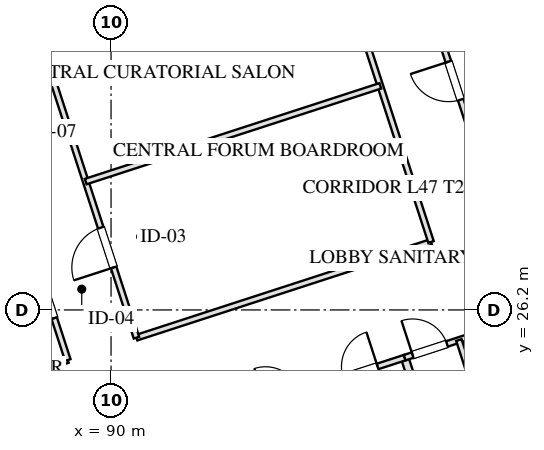
"""IFC4 building model, lengths in metres.
Left out: names, types, materials, properties, quantities, classifications, styles, units other than length and angle.
Written with IfcOpenShell. Run it as: python <this file> out.ifc"""

import sys

from ifc_helpers import new_model, si_unit, direction, frame, frame_2d, origin, place, context, subcontext, project, spatial, rectangle, extrude, element, fill, save


model = new_model("IFC4")
c1 = context("Model", 3, precision=1e-05, world=origin(), true_north=direction((0.0, 1.0)))
c2 = subcontext(c1, "Body", "Model", "MODEL_VIEW")
j1 = project(units=[si_unit("LENGTHUNIT", "METRE"), si_unit("PLANEANGLEUNIT", "RADIAN")], contexts=[c1])
p1 = place(None, origin())
s1 = spatial("IfcSite", under=j1, at=p1, CompositionType="ELEMENT")
p2 = place(p1, origin())
s2 = spatial("IfcBuilding", under=s1, at=p2, CompositionType="ELEMENT")
p3 = place(p2, frame((0.0, 0.0, 177.1)))
s3 = spatial("IfcBuildingStorey", under=s2, at=p3, CompositionType="ELEMENT", Elevation=177.1)
p4 = place(p3, frame((98.224, 59.173, 0.0), z_axis=(0.0, 0.0, 1.0), x_axis=(0.309014228706, -0.951057414911, 0.0)))
e1 = element("IfcWall", 1, at=p4, inside=s3, PredefinedType="SOLIDWALL", context=c2, shape_type="SweptSolid", body=[
    extrude(rectangle(XDim=42.8, YDim=0.4, at=frame_2d((21.4, 0.0))), origin(), (0.0, 0.0, 1.0), 2.61),
])
p5 = place(p4, frame((26.75, 0.0, 0.75)))
e2 = element("IfcOpeningElement", 2, at=p5, cuts=e1, PredefinedType="OPENING", context=c2, shape_type="SweptSolid", body=[
    extrude(rectangle(XDim=2.1, YDim=1.46, at=frame_2d((1.05, 0.73))), frame((0.0, 0.21, 0.0), z_axis=(0.0, -1.0, 0.0), x_axis=(1.0, 0.0, 0.0)), (0.0, 0.0, 1.0), 0.42),
])
p6 = place(p4, frame((22.95, 0.0, 0.75)))
e3 = element("IfcOpeningElement", 3, at=p6, cuts=e1, PredefinedType="OPENING", context=c2, shape_type="SweptSolid", body=[
    extrude(rectangle(XDim=2.1, YDim=1.46, at=frame_2d((1.05, 0.73))), frame((0.0, 0.21, 0.0), z_axis=(0.0, -1.0, 0.0), x_axis=(1.0, 0.0, 0.0)), (0.0, 0.0, 1.0), 0.42),
])
p7 = place(p4, frame((16.45, 0.0, 0.0)))
e4 = element("IfcOpeningElement", 4, at=p7, cuts=e1, PredefinedType="OPENING", context=c2, shape_type="SweptSolid", body=[
    extrude(rectangle(XDim=1.1, YDim=2.15, at=frame_2d((0.55, 1.075))), frame((0.0, 0.21, 0.0), z_axis=(0.0, -1.0, 0.0), x_axis=(1.0, 0.0, 0.0)), (0.0, 0.0, 1.0), 0.42),
])
p8 = place(p3, frame((97.727, 24.944, 0.0), z_axis=(0.0, 0.0, 1.0), x_axis=(0.309016001439, -0.951056838919, 0.0)))
e5 = element("IfcWall", 5, at=p8, inside=s3, PredefinedType="PARTITIONING", context=c2, shape_type="SweptSolid", body=[
    extrude(rectangle(XDim=8.43, YDim=0.2, at=frame_2d((4.215, 0.0))), origin(), (0.0, 0.0, 1.0), 3.175),
])
p9 = place(p3, frame((93.542, 23.585, 0.0), z_axis=(0.0, 0.0, 1.0), x_axis=(0.951063829732, 0.308994485023, 0.0)))
e6 = element("IfcWall", 6, at=p9, inside=s3, PredefinedType="PARTITIONING", context=c2, shape_type="SweptSolid", body=[
    extrude(rectangle(XDim=4.4, YDim=0.15, at=frame_2d((2.2, 0.0))), origin(), (0.0, 0.0, 1.0), 3.175),
])
p10 = place(p9, frame((0.55, 0.0, 0.0)))
e7 = element("IfcOpeningElement", 7, at=p10, cuts=e6, PredefinedType="OPENING", context=c2, shape_type="SweptSolid", body=[
    extrude(rectangle(XDim=0.95, YDim=2.05, at=frame_2d((0.475, 1.025))), frame((0.0, 0.085, 0.0), z_axis=(0.0, -1.0, 0.0), x_axis=(1.0, 0.0, 0.0)), (0.0, 0.0, 1.0), 0.17),
])
p11 = place(p9, frame((2.7, 0.0, 0.0)))
e8 = element("IfcOpeningElement", 8, at=p11, cuts=e6, PredefinedType="OPENING", context=c2, shape_type="SweptSolid", body=[
    extrude(rectangle(XDim=0.95, YDim=2.05, at=frame_2d((0.475, 1.025))), frame((0.0, 0.085, 0.0), z_axis=(0.0, -1.0, 0.0), x_axis=(1.0, 0.0, 0.0)), (0.0, 0.0, 1.0), 0.17),
])
p12 = place(p3, frame((97.727, 24.944, 0.0), z_axis=(0.0, 0.0, 1.0), x_axis=(0.951036872128, 0.309077446369, 0.0)))
e9 = element("IfcWall", 9, at=p12, inside=s3, PredefinedType="PARTITIONING", context=c2, shape_type="SweptSolid", body=[
    extrude(rectangle(XDim=3.2, YDim=0.15, at=frame_2d((1.6, 0.0))), origin(), (0.0, 0.0, 1.0), 3.175),
])
p13 = place(p12, frame((0.22, 0.0, 0.0)))
e10 = element("IfcOpeningElement", 10, at=p13, cuts=e9, PredefinedType="OPENING", context=c2, shape_type="SweptSolid", body=[
    extrude(rectangle(XDim=0.95, YDim=2.05, at=frame_2d((0.475, 1.025))), frame((0.0, 0.085, 0.0), z_axis=(0.0, -1.0, 0.0), x_axis=(1.0, 0.0, 0.0)), (0.0, 0.0, 1.0), 0.17),
])
p14 = place(p3, frame((99.153, 25.408, 0.0), z_axis=(0.0, 0.0, 1.0), x_axis=(0.309016001439, -0.951056838919, 0.0)))
e11 = element("IfcWall", 11, at=p14, inside=s3, PredefinedType="PARTITIONING", context=c2, shape_type="SweptSolid", body=[
    extrude(rectangle(XDim=8.43, YDim=0.15, at=frame_2d((4.215, 0.0))), origin(), (0.0, 0.0, 1.0), 3.175),
])
p15 = place(p14, frame((2.55, 0.0, 0.0)))
e12 = element("IfcOpeningElement", 12, at=p15, cuts=e11, PredefinedType="OPENING", context=c2, shape_type="SweptSolid", body=[
    extrude(rectangle(XDim=0.95, YDim=2.05, at=frame_2d((0.475, 1.025))), frame((0.0, 0.085, 0.0), z_axis=(0.0, -1.0, 0.0), x_axis=(1.0, 0.0, 0.0)), (0.0, 0.0, 1.0), 0.17),
])
p16 = place(p14, frame((4.7, 0.0, 0.0)))
e13 = element("IfcOpeningElement", 13, at=p16, cuts=e11, PredefinedType="OPENING", context=c2, shape_type="SweptSolid", body=[
    extrude(rectangle(XDim=0.9, YDim=2.05, at=frame_2d((0.45, 1.025))), frame((0.0, 0.085, 0.0), z_axis=(0.0, -1.0, 0.0), x_axis=(1.0, 0.0, 0.0)), (0.0, 0.0, 1.0), 0.17),
])
p17 = place(p14, frame((6.8, 0.0, 0.0)))
e14 = element("IfcOpeningElement", 14, at=p17, cuts=e11, PredefinedType="OPENING", context=c2, shape_type="SweptSolid", body=[
    extrude(rectangle(XDim=0.9, YDim=2.05, at=frame_2d((0.45, 1.025))), frame((0.0, 0.085, 0.0), z_axis=(0.0, -1.0, 0.0), x_axis=(1.0, 0.0, 0.0)), (0.0, 0.0, 1.0), 0.17),
])
p18 = place(p3, frame((77.925, 21.328, 0.0), z_axis=(0.0, 0.0, 1.0), x_axis=(0.951054972381, 0.309021746015, 0.0)))
e15 = element("IfcWall", 15, at=p18, inside=s3, PredefinedType="PARTITIONING", context=c2, shape_type="SweptSolid", body=[
    extrude(rectangle(XDim=11.5, YDim=0.15, at=frame_2d((5.75, 0.0))), origin(), (0.0, 0.0, 1.0), 3.175),
])
p19 = place(p3, frame((90.669, 25.469, 0.0), z_axis=(0.0, 0.0, 1.0), x_axis=(0.95106136293, 0.309002077568, 0.0)))
e16 = element("IfcWall", 16, at=p19, inside=s3, PredefinedType="PARTITIONING", context=c2, shape_type="SweptSolid", body=[
    extrude(rectangle(XDim=8.15, YDim=0.15, at=frame_2d((4.075, 0.0))), origin(), (0.0, 0.0, 1.0), 3.175),
])
p20 = place(p3, frame((88.862, 24.882, 0.0), z_axis=(0.0, 0.0, 1.0), x_axis=(-0.309008771245, 0.951059188113, 0.0)))
e17 = element("IfcWall", 17, at=p20, inside=s3, PredefinedType="PARTITIONING", context=c2, shape_type="SweptSolid", body=[
    extrude(rectangle(XDim=16.64, YDim=0.15, at=frame_2d((8.32, 0.0))), origin(), (0.0, 0.0, 1.0), 3.175),
])
p21 = place(p20, frame((1.16, 0.0, 0.0)))
e18 = element("IfcOpeningElement", 18, at=p21, cuts=e17, PredefinedType="OPENING", context=c2, shape_type="SweptSolid", body=[
    extrude(rectangle(XDim=1.0, YDim=2.05, at=frame_2d((0.5, 1.025))), frame((0.0, 0.085, 0.0), z_axis=(0.0, -1.0, 0.0), x_axis=(1.0, 0.0, 0.0)), (0.0, 0.0, 1.0), 0.17),
])
p22 = place(p20, frame((5.48, 0.0, 0.0)))
e19 = element("IfcOpeningElement", 19, at=p22, cuts=e17, PredefinedType="OPENING", context=c2, shape_type="SweptSolid", body=[
    extrude(rectangle(XDim=1.05, YDim=2.05, at=frame_2d((0.525, 1.025))), frame((0.0, 0.085, 0.0), z_axis=(0.0, -1.0, 0.0), x_axis=(1.0, 0.0, 0.0)), (0.0, 0.0, 1.0), 0.17),
])
p23 = place(p20, frame((8.08, 0.0, 0.0)))
e20 = element("IfcOpeningElement", 20, at=p23, cuts=e17, PredefinedType="OPENING", context=c2, shape_type="SweptSolid", body=[
    extrude(rectangle(XDim=1.0, YDim=2.05, at=frame_2d((0.5, 1.025))), frame((0.0, 0.085, 0.0), z_axis=(0.0, -1.0, 0.0), x_axis=(1.0, 0.0, 0.0)), (0.0, 0.0, 1.0), 0.17),
])
p24 = place(p20, frame((10.92, 0.0, 0.0)))
e21 = element("IfcOpeningElement", 21, at=p24, cuts=e17, PredefinedType="OPENING", context=c2, shape_type="SweptSolid", body=[
    extrude(rectangle(XDim=1.0, YDim=2.05, at=frame_2d((0.5, 1.025))), frame((0.0, 0.085, 0.0), z_axis=(0.0, -1.0, 0.0), x_axis=(1.0, 0.0, 0.0)), (0.0, 0.0, 1.0), 0.17),
])
p25 = place(p20, frame((14.48, 0.0, 0.0)))
e22 = element("IfcOpeningElement", 22, at=p25, cuts=e17, PredefinedType="OPENING", context=c2, shape_type="SweptSolid", body=[
    extrude(rectangle(XDim=1.0, YDim=2.05, at=frame_2d((0.5, 1.025))), frame((0.0, 0.085, 0.0), z_axis=(0.0, -1.0, 0.0), x_axis=(1.0, 0.0, 0.0)), (0.0, 0.0, 1.0), 0.17),
])
p26 = place(p3, frame((90.669, 25.469, 0.0), z_axis=(0.0, 0.0, 1.0), x_axis=(-0.309022042254, 0.951054876125, 0.0)))
e23 = element("IfcWall", 23, at=p26, inside=s3, PredefinedType="PARTITIONING", context=c2, shape_type="SweptSolid", body=[
    extrude(rectangle(XDim=16.64, YDim=0.15, at=frame_2d((8.32, 0.0))), origin(), (0.0, 0.0, 1.0), 3.175),
])
p27 = place(p26, frame((1.944, 0.0, 0.0)))
e24 = element("IfcOpeningElement", 24, at=p27, cuts=e23, PredefinedType="OPENING", context=c2, shape_type="SweptSolid", body=[
    extrude(rectangle(XDim=1.1, YDim=2.05, at=frame_2d((0.55, 1.025))), frame((0.0, 0.085, 0.0), z_axis=(0.0, -1.0, 0.0), x_axis=(1.0, 0.0, 0.0)), (0.0, 0.0, 1.0), 0.17),
])
p28 = place(p26, frame((14.264, 0.0, 0.0)))
e25 = element("IfcOpeningElement", 25, at=p28, cuts=e23, PredefinedType="OPENING", context=c2, shape_type="SweptSolid", body=[
    extrude(rectangle(XDim=1.1, YDim=2.05, at=frame_2d((0.55, 1.025))), frame((0.0, 0.085, 0.0), z_axis=(0.0, -1.0, 0.0), x_axis=(1.0, 0.0, 0.0)), (0.0, 0.0, 1.0), 0.17),
])
p29 = place(p3, frame((98.42, 27.988, 0.0), z_axis=(0.0, 0.0, 1.0), x_axis=(-0.309004459387, 0.951060589068, 0.0)))
e26 = element("IfcWall", 26, at=p29, inside=s3, PredefinedType="PARTITIONING", context=c2, shape_type="SweptSolid", body=[
    extrude(rectangle(XDim=16.64, YDim=0.15, at=frame_2d((8.32, 0.0))), origin(), (0.0, 0.0, 1.0), 3.175),
])
p30 = place(p29, frame((7.68, 0.0, 0.0)))
e27 = element("IfcOpeningElement", 27, at=p30, cuts=e26, PredefinedType="OPENING", context=c2, shape_type="SweptSolid", body=[
    extrude(rectangle(XDim=1.1, YDim=2.05, at=frame_2d((0.55, 1.025))), frame((0.0, 0.085, 0.0), z_axis=(0.0, -1.0, 0.0), x_axis=(1.0, 0.0, 0.0)), (0.0, 0.0, 1.0), 0.17),
])
p31 = place(p3, frame((100.227, 28.575, 0.0), z_axis=(0.0, 0.0, 1.0), x_axis=(-0.30901773025, 0.951056277195, 0.0)))
e28 = element("IfcWall", 28, at=p31, inside=s3, PredefinedType="PARTITIONING", context=c2, shape_type="SweptSolid", body=[
    extrude(rectangle(XDim=16.64, YDim=0.15, at=frame_2d((8.32, 0.0))), origin(), (0.0, 0.0, 1.0), 3.175),
])
p32 = place(p31, frame((3.32, 0.0, 0.0)))
e29 = element("IfcOpeningElement", 29, at=p32, cuts=e28, PredefinedType="OPENING", context=c2, shape_type="SweptSolid", body=[
    extrude(rectangle(XDim=1.05, YDim=2.05, at=frame_2d((0.525, 1.025))), frame((0.0, 0.085, 0.0), z_axis=(0.0, -1.0, 0.0), x_axis=(1.0, 0.0, 0.0)), (0.0, 0.0, 1.0), 0.17),
])
p33 = place(p31, frame((11.64, 0.0, 0.0)))
e30 = element("IfcOpeningElement", 30, at=p33, cuts=e28, PredefinedType="OPENING", context=c2, shape_type="SweptSolid", body=[
    extrude(rectangle(XDim=1.0, YDim=2.05, at=frame_2d((0.5, 1.025))), frame((0.0, 0.085, 0.0), z_axis=(0.0, -1.0, 0.0), x_axis=(1.0, 0.0, 0.0)), (0.0, 0.0, 1.0), 0.17),
])
p34 = place(p3, frame((89.334, 29.578, 0.0), z_axis=(0.0, 0.0, 1.0), x_axis=(0.951052558989, 0.309029173445, 0.0)))
e31 = element("IfcWall", 31, at=p34, inside=s3, PredefinedType="PARTITIONING", context=c2, shape_type="SweptSolid", body=[
    extrude(rectangle(XDim=8.15, YDim=0.15, at=frame_2d((4.075, 0.0))), origin(), (0.0, 0.0, 1.0), 3.175),
])
p35 = place(p11, origin())
e32 = element("IfcDoor", 32, at=p35, inside=s3, OperationType="SINGLE_SWING_RIGHT", PredefinedType="DOOR", context=c2, shape_type="SweptSolid", body=[
    extrude(rectangle(XDim=0.95, YDim=2.05, at=frame_2d((0.475, 1.025))), frame((0.0, 0.025, 0.0), z_axis=(0.0, -1.0, 0.0), x_axis=(1.0, 0.0, 0.0)), (0.0, 0.0, 1.0), 0.05),
])
fill(e8, e32)
p36 = place(p13, origin())
e33 = element("IfcDoor", 33, at=p36, inside=s3, OperationType="SINGLE_SWING_LEFT", PredefinedType="DOOR", context=c2, shape_type="SweptSolid", body=[
    extrude(rectangle(XDim=0.95, YDim=2.05, at=frame_2d((0.475, 1.025))), frame((0.0, 0.025, 0.0), z_axis=(0.0, -1.0, 0.0), x_axis=(1.0, 0.0, 0.0)), (0.0, 0.0, 1.0), 0.05),
])
fill(e10, e33)
p37 = place(p21, origin())
e34 = element("IfcDoor", 34, at=p37, inside=s3, OperationType="SINGLE_SWING_LEFT", PredefinedType="DOOR", context=c2, shape_type="SweptSolid", body=[
    extrude(rectangle(XDim=1.0, YDim=2.05, at=frame_2d((0.5, 1.025))), frame((0.0, 0.025, 0.0), z_axis=(0.0, -1.0, 0.0), x_axis=(1.0, 0.0, 0.0)), (0.0, 0.0, 1.0), 0.05),
])
fill(e18, e34)
p38 = place(p27, origin())
e35 = element("IfcDoor", 35, at=p38, inside=s3, OperationType="SINGLE_SWING_LEFT", PredefinedType="DOOR", context=c2, shape_type="SweptSolid", body=[
    extrude(rectangle(XDim=1.1, YDim=2.05, at=frame_2d((0.55, 1.025))), frame((0.0, 0.025, 0.0), z_axis=(0.0, -1.0, 0.0), x_axis=(1.0, 0.0, 0.0)), (0.0, 0.0, 1.0), 0.05),
])
fill(e24, e35)
p39 = place(p32, origin())
e36 = element("IfcDoor", 36, at=p39, inside=s3, OperationType="SINGLE_SWING_RIGHT", PredefinedType="DOOR", context=c2, shape_type="SweptSolid", body=[
    extrude(rectangle(XDim=1.05, YDim=2.05, at=frame_2d((0.525, 1.025))), frame((0.0, 0.025, 0.0), z_axis=(0.0, -1.0, 0.0), x_axis=(1.0, 0.0, 0.0)), (0.0, 0.0, 1.0), 0.05),
])
fill(e29, e36)
save(model, sys.argv[1])
